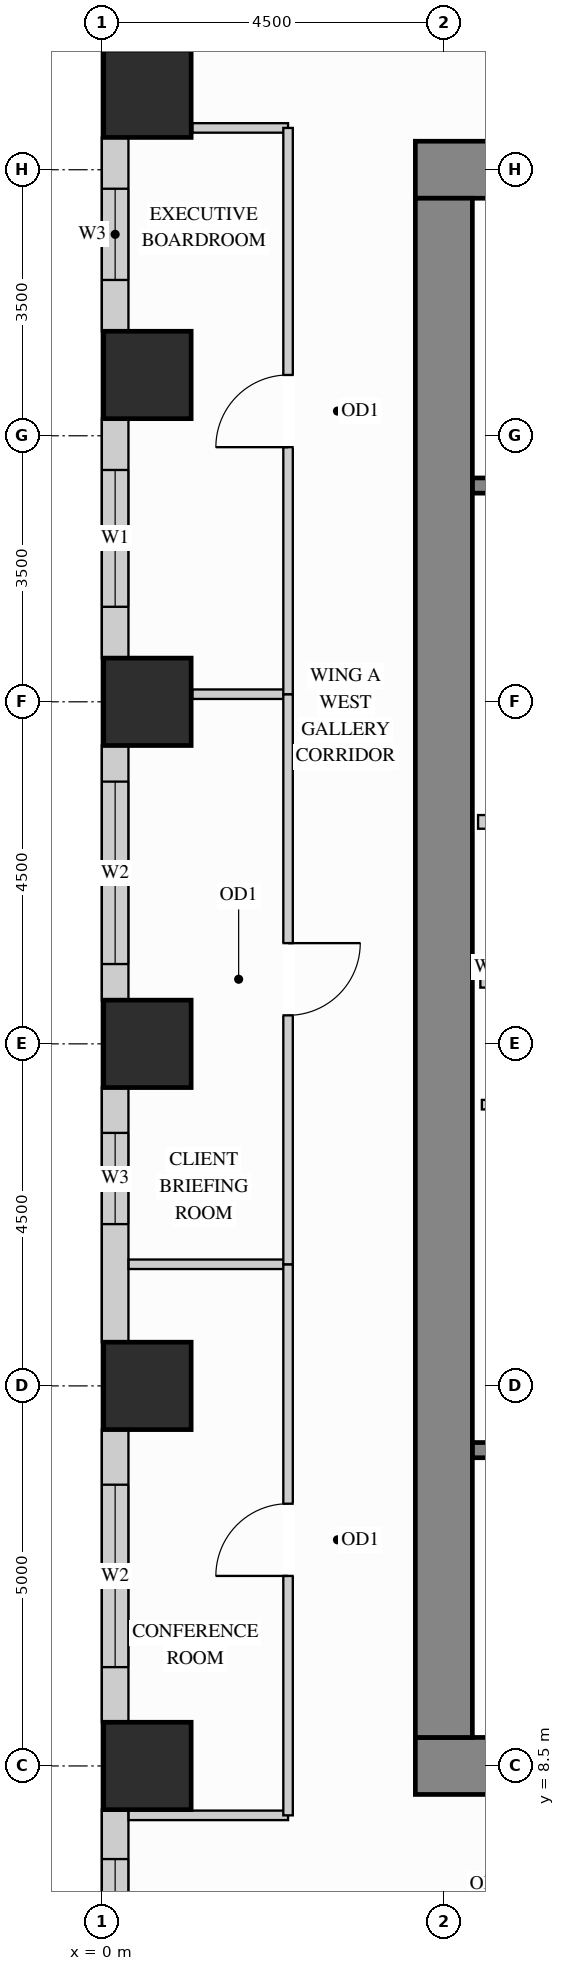
"""IFC4 building model, lengths in metres.
Left out: names, types, materials, properties, quantities, classifications, styles, units other than length and angle.
Written with IfcOpenShell. Run it as: python <this file> out.ifc"""

import sys

from ifc_helpers import new_model, si_unit, direction, frame, frame_2d, origin, origin_2d, place, context, subcontext, project, spatial, rectangle, extrude, source, transform, mapped, element, fill, save


model = new_model("IFC4")
c1 = context("Model", 3, precision=1e-05, world=origin(), true_north=direction((0.0, 1.0)))
c2 = subcontext(c1, "Body", "Model", "MODEL_VIEW")
j1 = project(units=[si_unit("LENGTHUNIT", "METRE"), si_unit("PLANEANGLEUNIT", "RADIAN")], contexts=[c1])
p1 = place(None, origin())
s1 = spatial("IfcSite", under=j1, at=p1, CompositionType="ELEMENT")
p2 = place(p1, origin())
s2 = spatial("IfcBuilding", under=s1, at=p2, CompositionType="ELEMENT")
p3 = place(p2, frame((0.0, 0.0, 131.4)))
s3 = spatial("IfcBuildingStorey", under=s2, at=p3, CompositionType="ELEMENT", Elevation=131.4)
m1 = source(origin(), c2, "Body", "SweptSolid", [
    extrude(rectangle(XDim=1.15, YDim=1.15, at=origin_2d()), origin(), (0.0, 0.0, 1.0), 3.38),
])
for number, where, z_axis, x_axis in (
    (1, (0.6, 13.5, 0.0), (0.0, 0.0, 1.0), (1.0, 0.0, 0.0)),
    (2, (0.6, 18.0, 0.0), (0.0, 0.0, 1.0), (1.0, 0.0, 0.0)),
    (3, (0.6, 22.5, 0.0), (0.0, 0.0, 1.0), (1.0, 0.0, 0.0)),
    (4, (0.6, 26.8, 0.0), (0.0, 0.0, 1.0), (1.0, 0.0, 0.0)),
    (5, (0.6, 30.5, 0.0), (0.0, 0.0, 1.0), (1.0, 0.0, 0.0)),
    (6, (0.6, 8.5, 0.0), (0.0, 0.0, 1.0), (1.0, 0.0, 0.0)),
):
    element("IfcColumn", number, at=place(p3, frame(where, z_axis=z_axis, x_axis=x_axis)), inside=s3, PredefinedType="COLUMN", context=c2, shape_type="MappedRepresentation", body=[
        mapped(m1, transform((0.0, 0.0, 0.0), x_axis=(1.0, 0.0, 0.0), y_axis=(0.0, 1.0, 0.0), z_axis=(0.0, 0.0, 1.0))),
    ])
m2 = source(origin(), c2, "Body", "SweptSolid", [
    extrude(rectangle(XDim=10.75, YDim=0.75, at=frame_2d((5.375, 0.0))), origin(), (0.0, 0.0, 1.0), 3.38),
])
for number, where, z_axis, x_axis in (
    (7, (4.125, 29.5, 0.0), (0.0, 0.0, 1.0), (1.0, 0.0, 0.0)),
    (8, (4.125, 8.5, 0.0), (0.0, 0.0, 1.0), (1.0, 0.0, 0.0)),
):
    element("IfcWall", number, at=place(p3, frame(where, z_axis=z_axis, x_axis=x_axis)), inside=s3, PredefinedType="SHEAR", context=c2, shape_type="MappedRepresentation", body=[
        mapped(m2, transform((0.0, 0.0, 0.0), x_axis=(1.0, 0.0, 0.0), y_axis=(0.0, 1.0, 0.0), z_axis=(0.0, 0.0, 1.0))),
    ])
m3 = source(origin(), c2, "Body", "SweptSolid", [
    extrude(rectangle(XDim=20.25, YDim=0.75, at=frame_2d((10.125, 0.0))), origin(), (0.0, 0.0, 1.0), 3.38),
])
p4 = place(p3, frame((4.5, 8.875, 0.0), z_axis=(0.0, 0.0, 1.0), x_axis=(0.0, 1.0, 0.0)))
e9 = element("IfcWall", 9, at=p4, inside=s3, PredefinedType="SHEAR", context=c2, shape_type="MappedRepresentation", body=[
    mapped(m3, transform((0.0, 0.0, 0.0), x_axis=(1.0, 0.0, 0.0), y_axis=(0.0, 1.0, 0.0), z_axis=(0.0, 0.0, 1.0))),
])
p5 = place(p3, frame((0.175, 29.927, 0.0), z_axis=(0.0, 0.0, 1.0), x_axis=(0.0, -1.0, 0.0)))
e10 = element("IfcWall", 10, at=p5, inside=s3, PredefinedType="SOLIDWALL", context=c2, shape_type="SweptSolid", body=[
    extrude(rectangle(XDim=2.554, YDim=0.35, at=frame_2d((1.277, 0.0))), origin(), (0.0, 0.0, 1.0), 3.365),
])
p6 = place(p5, frame((0.677, 0.0, 0.78)))
e11 = element("IfcOpeningElement", 11, at=p6, cuts=e10, PredefinedType="OPENING", context=c2, shape_type="SweptSolid", body=[
    extrude(rectangle(XDim=1.2, YDim=2.1, at=frame_2d((0.6, 1.05))), frame((0.0, 0.185, 0.0), z_axis=(0.0, -1.0, 0.0), x_axis=(1.0, 0.0, 0.0)), (0.0, 0.0, 1.0), 0.37),
])
p7 = place(p3, frame((0.175, 26.227, 0.0), z_axis=(0.0, 0.0, 1.0), x_axis=(0.0, -1.0, 0.0)))
e12 = element("IfcWall", 12, at=p7, inside=s3, PredefinedType="SOLIDWALL", context=c2, shape_type="SweptSolid", body=[
    extrude(rectangle(XDim=3.154, YDim=0.35, at=frame_2d((1.577, 0.0))), origin(), (0.0, 0.0, 1.0), 3.365),
])
p8 = place(p7, frame((0.677, 0.0, 0.78)))
e13 = element("IfcOpeningElement", 13, at=p8, cuts=e12, PredefinedType="OPENING", context=c2, shape_type="SweptSolid", body=[
    extrude(rectangle(XDim=1.8, YDim=2.1, at=frame_2d((0.9, 1.05))), frame((0.0, 0.185, 0.0), z_axis=(0.0, -1.0, 0.0), x_axis=(1.0, 0.0, 0.0)), (0.0, 0.0, 1.0), 0.37),
])
p9 = place(p3, frame((0.175, 21.927, 0.0), z_axis=(0.0, 0.0, 1.0), x_axis=(0.0, -1.0, 0.0)))
e14 = element("IfcWall", 14, at=p9, inside=s3, PredefinedType="SOLIDWALL", context=c2, shape_type="SweptSolid", body=[
    extrude(rectangle(XDim=3.354, YDim=0.35, at=frame_2d((1.677, 0.0))), origin(), (0.0, 0.0, 1.0), 3.365),
])
p10 = place(p9, frame((0.477, 0.0, 0.78)))
e15 = element("IfcOpeningElement", 15, at=p10, cuts=e14, PredefinedType="OPENING", context=c2, shape_type="SweptSolid", body=[
    extrude(rectangle(XDim=2.4, YDim=2.1, at=frame_2d((1.2, 1.05))), frame((0.0, 0.185, 0.0), z_axis=(0.0, -1.0, 0.0), x_axis=(1.0, 0.0, 0.0)), (0.0, 0.0, 1.0), 0.37),
])
p11 = place(p3, frame((0.175, 17.427, 0.0), z_axis=(0.0, 0.0, 1.0), x_axis=(0.0, -1.0, 0.0)))
e16 = element("IfcWall", 16, at=p11, inside=s3, PredefinedType="SOLIDWALL", context=c2, shape_type="SweptSolid", body=[
    extrude(rectangle(XDim=3.354, YDim=0.35, at=frame_2d((1.677, 0.0))), origin(), (0.0, 0.0, 1.0), 3.365),
])
p12 = place(p11, frame((0.598, 0.0, 0.78)))
e17 = element("IfcOpeningElement", 17, at=p12, cuts=e16, PredefinedType="OPENING", context=c2, shape_type="SweptSolid", body=[
    extrude(rectangle(XDim=1.2, YDim=2.1, at=frame_2d((0.6, 1.05))), frame((0.0, 0.185, 0.0), z_axis=(0.0, -1.0, 0.0), x_axis=(1.0, 0.0, 0.0)), (0.0, 0.0, 1.0), 0.37),
])
p13 = place(p3, frame((0.175, 12.927, 0.0), z_axis=(0.0, 0.0, 1.0), x_axis=(0.0, -1.0, 0.0)))
e18 = element("IfcWall", 18, at=p13, inside=s3, PredefinedType="SOLIDWALL", context=c2, shape_type="SweptSolid", body=[
    extrude(rectangle(XDim=3.854, YDim=0.35, at=frame_2d((1.927, 0.0))), origin(), (0.0, 0.0, 1.0), 3.365),
])
p14 = place(p13, frame((0.727, 0.0, 0.78)))
e19 = element("IfcOpeningElement", 19, at=p14, cuts=e18, PredefinedType="OPENING", context=c2, shape_type="SweptSolid", body=[
    extrude(rectangle(XDim=2.4, YDim=2.1, at=frame_2d((1.2, 1.05))), frame((0.0, 0.185, 0.0), z_axis=(0.0, -1.0, 0.0), x_axis=(1.0, 0.0, 0.0)), (0.0, 0.0, 1.0), 0.37),
])
p15 = place(p3, frame((0.175, 7.927, 0.0), z_axis=(0.0, 0.0, 1.0), x_axis=(0.0, -1.0, 0.0)))
e20 = element("IfcWall", 20, at=p15, inside=s3, PredefinedType="SOLIDWALL", context=c2, shape_type="SweptSolid", body=[
    extrude(rectangle(XDim=3.854, YDim=0.35, at=frame_2d((1.927, 0.0))), origin(), (0.0, 0.0, 1.0), 3.365),
])
p16 = place(p15, frame((0.652, 0.0, 0.78)))
e21 = element("IfcOpeningElement", 21, at=p16, cuts=e20, PredefinedType="OPENING", context=c2, shape_type="SweptSolid", body=[
    extrude(rectangle(XDim=1.2, YDim=2.1, at=frame_2d((0.6, 1.05))), frame((0.0, 0.185, 0.0), z_axis=(0.0, -1.0, 0.0), x_axis=(1.0, 0.0, 0.0)), (0.0, 0.0, 1.0), 0.37),
])
m4 = source(origin(), c2, "Body", "SweptSolid", [
    extrude(rectangle(XDim=2.2, YDim=0.18, at=frame_2d((1.1, 0.0))), origin(), (0.0, 0.0, 1.0), 3.365),
])
p17 = place(p3, frame((4.95, 20.92, 0.0), z_axis=(0.0, 0.0, 1.0), x_axis=(1.0, 0.0, 0.0)))
e22 = element("IfcWall", 22, at=p17, inside=s3, PredefinedType="PARTITIONING", context=c2, shape_type="MappedRepresentation", body=[
    mapped(m4, transform((0.0, 0.0, 0.0), x_axis=(1.0, 0.0, 0.0), y_axis=(0.0, 1.0, 0.0), z_axis=(0.0, 0.0, 1.0))),
])
p18 = place(p3, frame((5.0, 17.2, 0.0), z_axis=(0.0, 0.0, 1.0), x_axis=(1.0, 0.0, 0.0)))
e23 = element("IfcWall", 23, at=p18, inside=s3, PredefinedType="PARTITIONING", context=c2, shape_type="SweptSolid", body=[
    extrude(rectangle(XDim=2.4, YDim=0.125, at=frame_2d((1.2, 0.0))), origin(), (0.0, 0.0, 1.0), 3.365),
])
p19 = place(p18, frame((0.7, 0.0, 0.0)))
e24 = element("IfcOpeningElement", 24, at=p19, cuts=e23, PredefinedType="OPENING", context=c2, shape_type="SweptSolid", body=[
    extrude(rectangle(XDim=0.85, YDim=2.1, at=frame_2d((0.425, 1.05))), frame((0.0, 0.073, 0.0), z_axis=(0.0, -1.0, 0.0), x_axis=(1.0, 0.0, 0.0)), (0.0, 0.0, 1.0), 0.145),
])
m5 = source(origin(), c2, "Body", "SweptSolid", [
    extrude(rectangle(XDim=1.26, YDim=0.125, at=frame_2d((0.63, 0.0))), origin(), (0.0, 0.0, 1.0), 3.365),
])
p20 = place(p3, frame((1.19, 30.05, 0.0), z_axis=(0.0, 0.0, 1.0), x_axis=(1.0, 0.0, 0.0)))
e25 = element("IfcWall", 25, at=p20, inside=s3, PredefinedType="PARTITIONING", context=c2, shape_type="MappedRepresentation", body=[
    mapped(m5, transform((0.0, 0.0, 0.0), x_axis=(1.0, 0.0, 0.0), y_axis=(0.0, 1.0, 0.0), z_axis=(0.0, 0.0, 1.0))),
])
m6 = source(origin(), c2, "Body", "SweptSolid", [
    extrude(rectangle(XDim=2.098, YDim=0.125, at=frame_2d((1.049, 0.0))), origin(), (0.0, 0.0, 1.0), 3.365),
])
for number, where, z_axis, x_axis in (
    (26, (0.352, 7.85, 0.0), (0.0, 0.0, 1.0), (1.0, 0.0, 0.0)),
    (27, (0.352, 15.1, 0.0), (0.0, 0.0, 1.0), (1.0, 0.0, 0.0)),
):
    element("IfcWall", number, at=place(p3, frame(where, z_axis=z_axis, x_axis=x_axis)), inside=s3, PredefinedType="PARTITIONING", context=c2, shape_type="MappedRepresentation", body=[
        mapped(m6, transform((0.0, 0.0, 0.0), x_axis=(1.0, 0.0, 0.0), y_axis=(0.0, 1.0, 0.0), z_axis=(0.0, 0.0, 1.0))),
    ])
p21 = place(p3, frame((1.19, 22.6, 0.0), z_axis=(0.0, 0.0, 1.0), x_axis=(1.0, 0.0, 0.0)))
e28 = element("IfcWall", 28, at=p21, inside=s3, PredefinedType="PARTITIONING", context=c2, shape_type="MappedRepresentation", body=[
    mapped(m5, transform((0.0, 0.0, 0.0), x_axis=(1.0, 0.0, 0.0), y_axis=(0.0, 1.0, 0.0), z_axis=(0.0, 0.0, 1.0))),
])
p22 = place(p3, frame((2.45, 7.85, 0.0), z_axis=(0.0, 0.0, 1.0), x_axis=(0.0, 1.0, 0.0)))
e29 = element("IfcWall", 29, at=p22, inside=s3, PredefinedType="PARTITIONING", context=c2, shape_type="SweptSolid", body=[
    extrude(rectangle(XDim=7.25, YDim=0.125, at=frame_2d((3.625, 0.0))), origin(), (0.0, 0.0, 1.0), 3.365),
])
p23 = place(p22, frame((3.15, 0.0, 0.0)))
e30 = element("IfcOpeningElement", 30, at=p23, cuts=e29, PredefinedType="OPENING", context=c2, shape_type="SweptSolid", body=[
    extrude(rectangle(XDim=0.95, YDim=2.15, at=frame_2d((0.475, 1.075))), frame((0.0, 0.073, 0.0), z_axis=(0.0, -1.0, 0.0), x_axis=(1.0, 0.0, 0.0)), (0.0, 0.0, 1.0), 0.145),
])
p24 = place(p3, frame((2.45, 15.1, 0.0), z_axis=(0.0, 0.0, 1.0), x_axis=(0.0, 1.0, 0.0)))
e31 = element("IfcWall", 31, at=p24, inside=s3, PredefinedType="PARTITIONING", context=c2, shape_type="SweptSolid", body=[
    extrude(rectangle(XDim=7.5, YDim=0.125, at=frame_2d((3.75, 0.0))), origin(), (0.0, 0.0, 1.0), 3.365),
])
p25 = place(p24, frame((3.275, 0.0, 0.0)))
e32 = element("IfcOpeningElement", 32, at=p25, cuts=e31, PredefinedType="OPENING", context=c2, shape_type="SweptSolid", body=[
    extrude(rectangle(XDim=0.95, YDim=2.15, at=frame_2d((0.475, 1.075))), frame((0.0, 0.073, 0.0), z_axis=(0.0, -1.0, 0.0), x_axis=(1.0, 0.0, 0.0)), (0.0, 0.0, 1.0), 0.145),
])
p26 = place(p3, frame((2.45, 22.6, 0.0), z_axis=(0.0, 0.0, 1.0), x_axis=(0.0, 1.0, 0.0)))
e33 = element("IfcWall", 33, at=p26, inside=s3, PredefinedType="PARTITIONING", context=c2, shape_type="SweptSolid", body=[
    extrude(rectangle(XDim=7.45, YDim=0.125, at=frame_2d((3.725, 0.0))), origin(), (0.0, 0.0, 1.0), 3.365),
])
p27 = place(p26, frame((3.25, 0.0, 0.0)))
e34 = element("IfcOpeningElement", 34, at=p27, cuts=e33, PredefinedType="OPENING", context=c2, shape_type="SweptSolid", body=[
    extrude(rectangle(XDim=0.95, YDim=2.15, at=frame_2d((0.475, 1.075))), frame((0.0, 0.073, 0.0), z_axis=(0.0, -1.0, 0.0), x_axis=(1.0, 0.0, 0.0)), (0.0, 0.0, 1.0), 0.145),
])
m7 = source(origin(), c2, "Body", "SweptSolid", [
    extrude(rectangle(XDim=2.09, YDim=0.2, at=frame_2d((1.045, 0.0))), origin(), (0.0, 0.0, 1.0), 3.365),
])
p28 = place(p3, frame((4.98, 18.84, 0.0), z_axis=(0.0, 0.0, 1.0), x_axis=(1.0, 0.0, 0.0)))
e35 = element("IfcWall", 35, at=p28, inside=s3, PredefinedType="PARTITIONING", context=c2, shape_type="MappedRepresentation", body=[
    mapped(m7, transform((0.0, 0.0, 0.0), x_axis=(1.0, 0.0, 0.0), y_axis=(0.0, 1.0, 0.0), z_axis=(0.0, 0.0, 1.0))),
])
p29 = place(p3, frame((4.877, 12.655, 0.0), z_axis=(0.0, 0.0, 1.0), x_axis=(1.0, 0.0, 0.0)))
e36 = element("IfcWall", 36, at=p29, inside=s3, PredefinedType="SHEAR", context=c2, shape_type="SweptSolid", body=[
    extrude(rectangle(XDim=7.528, YDim=0.2, at=frame_2d((3.764, 0.0))), origin(), (0.0, 0.0, 1.0), 3.38),
])
p30 = place(p29, frame((0.4, 0.0, 0.0)))
e37 = element("IfcOpeningElement", 37, at=p30, cuts=e36, PredefinedType="OPENING", context=c2, shape_type="SweptSolid", body=[
    extrude(rectangle(XDim=1.1, YDim=2.15, at=frame_2d((0.55, 1.075))), frame((0.0, 0.11, 0.0), z_axis=(0.0, -1.0, 0.0), x_axis=(1.0, 0.0, 0.0)), (0.0, 0.0, 1.0), 0.22),
])
p31 = place(p3, frame((4.877, 25.345, 0.0), z_axis=(0.0, 0.0, 1.0), x_axis=(1.0, 0.0, 0.0)))
e38 = element("IfcWall", 38, at=p31, inside=s3, PredefinedType="SHEAR", context=c2, shape_type="SweptSolid", body=[
    extrude(rectangle(XDim=7.528, YDim=0.2, at=frame_2d((3.764, 0.0))), origin(), (0.0, 0.0, 1.0), 3.38),
])
p32 = place(p31, frame((0.4, 0.0, 0.0)))
e39 = element("IfcOpeningElement", 39, at=p32, cuts=e38, PredefinedType="OPENING", context=c2, shape_type="SweptSolid", body=[
    extrude(rectangle(XDim=1.1, YDim=2.15, at=frame_2d((0.55, 1.075))), frame((0.0, 0.11, 0.0), z_axis=(0.0, -1.0, 0.0), x_axis=(1.0, 0.0, 0.0)), (0.0, 0.0, 1.0), 0.22),
])
m8 = source(origin(), c2, "Body", "SweptSolid", [
    extrude(rectangle(XDim=0.95, YDim=2.15, at=frame_2d((0.475, 1.075))), frame((0.0, 0.025, 0.0), z_axis=(0.0, -1.0, 0.0), x_axis=(1.0, 0.0, 0.0)), (0.0, 0.0, 1.0), 0.05),
])
p33 = place(p23, origin())
e40 = element("IfcDoor", 40, at=p33, inside=s3, OperationType="SINGLE_SWING_LEFT", PredefinedType="DOOR", context=c2, shape_type="MappedRepresentation", body=[
    mapped(m8, transform((0.0, 0.0, 0.0), x_axis=(1.0, 0.0, 0.0), y_axis=(0.0, 1.0, 0.0), z_axis=(0.0, 0.0, 1.0))),
])
fill(e30, e40)
p34 = place(p25, origin())
e41 = element("IfcDoor", 41, at=p34, inside=s3, OperationType="SINGLE_SWING_RIGHT", PredefinedType="DOOR", context=c2, shape_type="MappedRepresentation", body=[
    mapped(m8, transform((0.0, 0.0, 0.0), x_axis=(1.0, 0.0, 0.0), y_axis=(0.0, 1.0, 0.0), z_axis=(0.0, 0.0, 1.0))),
])
fill(e32, e41)
p35 = place(p27, origin())
e42 = element("IfcDoor", 42, at=p35, inside=s3, OperationType="SINGLE_SWING_LEFT", PredefinedType="DOOR", context=c2, shape_type="MappedRepresentation", body=[
    mapped(m8, transform((0.0, 0.0, 0.0), x_axis=(1.0, 0.0, 0.0), y_axis=(0.0, 1.0, 0.0), z_axis=(0.0, 0.0, 1.0))),
])
fill(e34, e42)
m9 = source(origin(), c2, "Body", "SweptSolid", [
    extrude(rectangle(XDim=1.8, YDim=2.1, at=frame_2d((0.9, 1.05))), frame((0.0, 0.03, 0.0), z_axis=(0.0, -1.0, 0.0), x_axis=(1.0, 0.0, 0.0)), (0.0, 0.0, 1.0), 0.06),
])
p36 = place(p8, origin())
e43 = element("IfcWindow", 43, at=p36, inside=s3, PartitioningType="SINGLE_PANEL", PredefinedType="WINDOW", context=c2, shape_type="MappedRepresentation", body=[
    mapped(m9, transform((0.0, 0.0, 0.0), x_axis=(1.0, 0.0, 0.0), y_axis=(0.0, 1.0, 0.0), z_axis=(0.0, 0.0, 1.0))),
])
fill(e13, e43)
m10 = source(origin(), c2, "Body", "SweptSolid", [
    extrude(rectangle(XDim=2.4, YDim=2.1, at=frame_2d((1.2, 1.05))), frame((0.0, 0.03, 0.0), z_axis=(0.0, -1.0, 0.0), x_axis=(1.0, 0.0, 0.0)), (0.0, 0.0, 1.0), 0.06),
])
p37 = place(p10, origin())
e44 = element("IfcWindow", 44, at=p37, inside=s3, PartitioningType="SINGLE_PANEL", PredefinedType="WINDOW", context=c2, shape_type="MappedRepresentation", body=[
    mapped(m10, transform((0.0, 0.0, 0.0), x_axis=(1.0, 0.0, 0.0), y_axis=(0.0, 1.0, 0.0), z_axis=(0.0, 0.0, 1.0))),
])
fill(e15, e44)
p38 = place(p14, origin())
e45 = element("IfcWindow", 45, at=p38, inside=s3, PartitioningType="SINGLE_PANEL", PredefinedType="WINDOW", context=c2, shape_type="MappedRepresentation", body=[
    mapped(m10, transform((0.0, 0.0, 0.0), x_axis=(1.0, 0.0, 0.0), y_axis=(0.0, 1.0, 0.0), z_axis=(0.0, 0.0, 1.0))),
])
fill(e19, e45)
m11 = source(origin(), c2, "Body", "SweptSolid", [
    extrude(rectangle(XDim=1.2, YDim=2.1, at=frame_2d((0.6, 1.05))), frame((0.0, 0.03, 0.0), z_axis=(0.0, -1.0, 0.0), x_axis=(1.0, 0.0, 0.0)), (0.0, 0.0, 1.0), 0.06),
])
p39 = place(p6, origin())
e46 = element("IfcWindow", 46, at=p39, inside=s3, PartitioningType="SINGLE_PANEL", PredefinedType="WINDOW", context=c2, shape_type="MappedRepresentation", body=[
    mapped(m11, transform((0.0, 0.0, 0.0), x_axis=(1.0, 0.0, 0.0), y_axis=(0.0, 1.0, 0.0), z_axis=(0.0, 0.0, 1.0))),
])
fill(e11, e46)
p40 = place(p12, origin())
e47 = element("IfcWindow", 47, at=p40, inside=s3, PartitioningType="SINGLE_PANEL", PredefinedType="WINDOW", context=c2, shape_type="MappedRepresentation", body=[
    mapped(m11, transform((0.0, 0.0, 0.0), x_axis=(1.0, 0.0, 0.0), y_axis=(0.0, 1.0, 0.0), z_axis=(0.0, 0.0, 1.0))),
])
fill(e17, e47)
p41 = place(p16, origin())
e48 = element("IfcWindow", 48, at=p41, inside=s3, PartitioningType="SINGLE_PANEL", PredefinedType="WINDOW", context=c2, shape_type="MappedRepresentation", body=[
    mapped(m11, transform((0.0, 0.0, 0.0), x_axis=(1.0, 0.0, 0.0), y_axis=(0.0, 1.0, 0.0), z_axis=(0.0, 0.0, 1.0))),
])
fill(e21, e48)
save(model, sys.argv[1])
